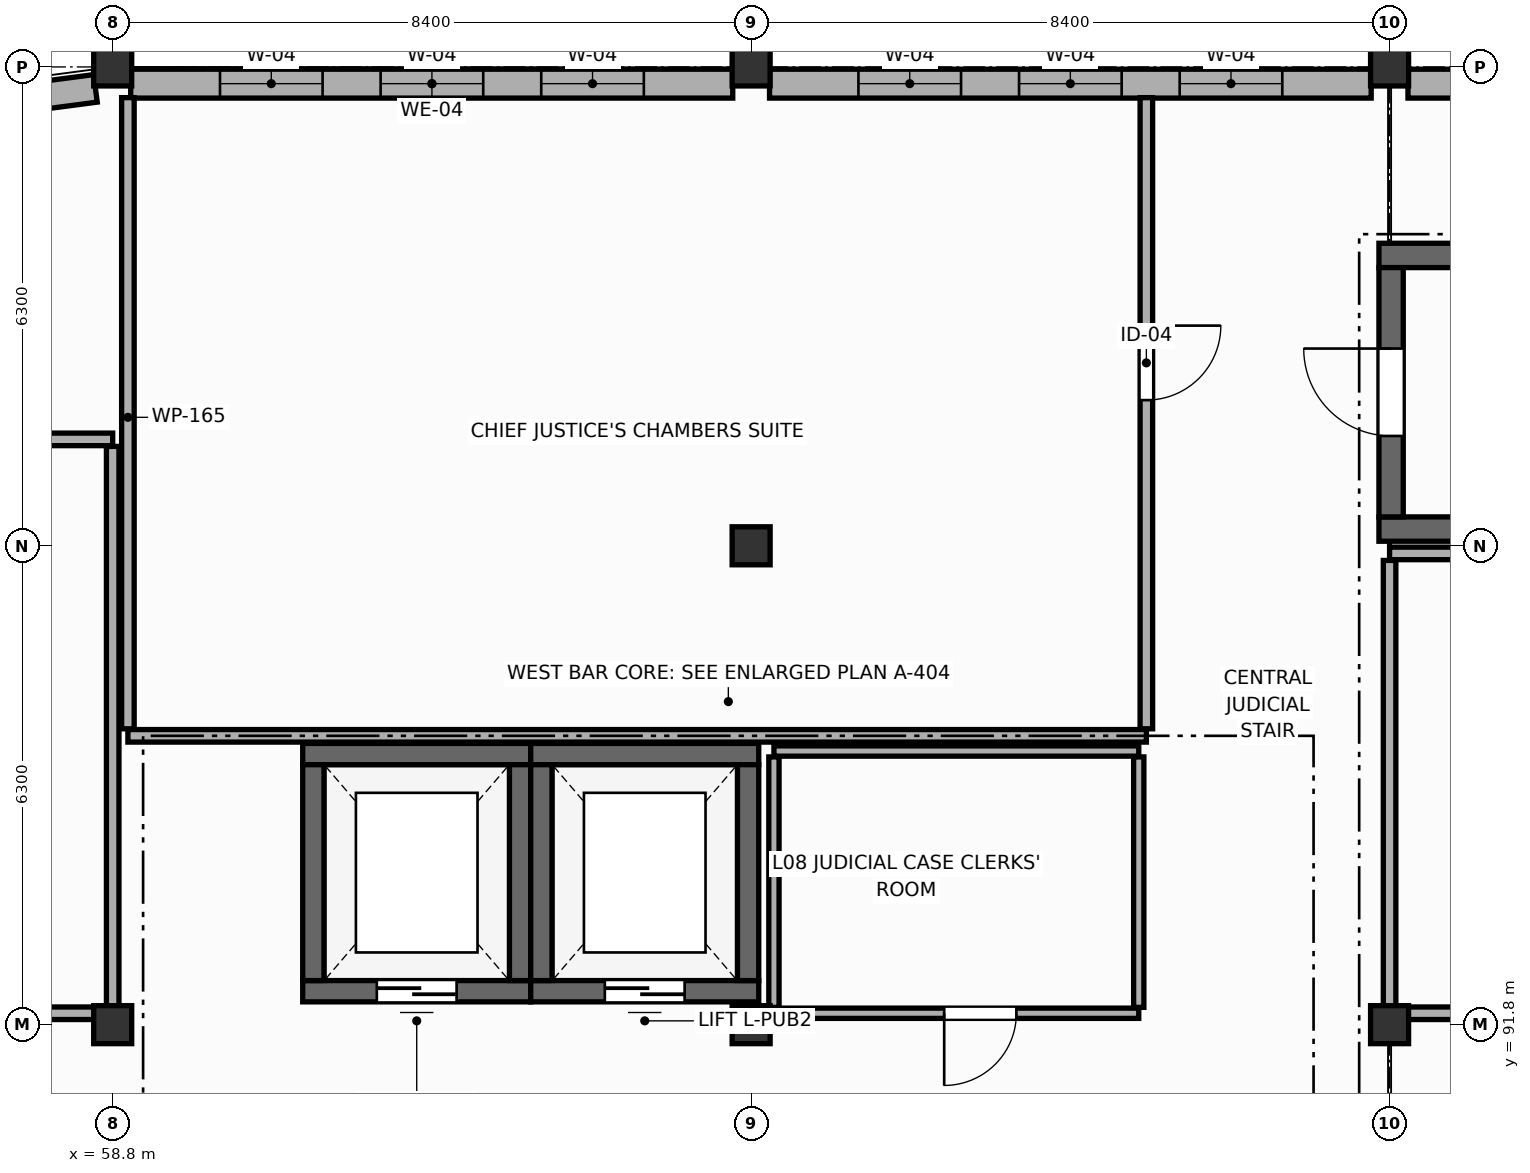
"""IFC4 building model, lengths in metres.
Left out: names, types, materials, properties, quantities, classifications, styles, units other than length and angle.
Written with IfcOpenShell. Run it as: python <this file> out.ifc"""

import sys

from ifc_helpers import new_model, si_unit, direction, frame, frame_2d, origin, origin_2d, place, context, subcontext, project, spatial, rectangle, extrude, element, fill, save


model = new_model("IFC4")
c1 = context("Model", 3, precision=1e-05, world=origin(), true_north=direction((0.0, 1.0)))
c2 = subcontext(c1, "Body", "Model", "MODEL_VIEW")
j1 = project(units=[si_unit("LENGTHUNIT", "METRE"), si_unit("PLANEANGLEUNIT", "RADIAN")], contexts=[c1])
p1 = place(None, origin())
s1 = spatial("IfcSite", under=j1, at=p1, CompositionType="ELEMENT")
p2 = place(p1, origin())
s2 = spatial("IfcBuilding", under=s1, at=p2, CompositionType="ELEMENT")
p3 = place(p2, frame((0.0, 0.0, 31.2)))
s3 = spatial("IfcBuildingStorey", under=s2, at=p3, CompositionType="ELEMENT", Elevation=31.2)
for number, where, z_axis, x_axis in (
    (1, (58.8, 91.8, 0.0), (0.0, 0.0, 1.0), (1.0, 0.0, 0.0)),
    (2, (58.8, 104.4, 0.0), (0.0, 0.0, 1.0), (1.0, 0.0, 0.0)),
    (3, (67.2, 91.8, 0.0), (0.0, 0.0, 1.0), (1.0, 0.0, 0.0)),
    (4, (67.2, 104.4, 0.0), (0.0, 0.0, 1.0), (1.0, 0.0, 0.0)),
    (5, (67.2, 98.1, 0.0), (0.0, 0.0, 1.0), (1.0, 0.0, 0.0)),
    (6, (75.6, 91.8, 0.0), (0.0, 0.0, 1.0), (1.0, 0.0, 0.0)),
    (7, (75.6, 104.4, 0.0), (0.0, 0.0, 1.0), (1.0, 0.0, 0.0)),
):
    element("IfcColumn", number, at=place(p3, frame(where, z_axis=z_axis, x_axis=x_axis)), inside=s3, PredefinedType="COLUMN", context=c2, shape_type="SweptSolid", body=[
        extrude(rectangle(XDim=0.5, YDim=0.5, at=origin_2d()), origin(), (0.0, 0.0, 1.0), 4.2),
    ])
p4 = place(p3, frame((59.037, 104.18, 0.0), z_axis=(0.0, 0.0, 1.0), x_axis=(1.0, 0.0, 0.0)))
e8 = element("IfcWall", 8, at=p4, inside=s3, PredefinedType="STANDARD", context=c2, shape_type="SweptSolid", body=[
    extrude(rectangle(XDim=7.921, YDim=0.38, at=frame_2d((3.96, 0.0))), origin(), (0.0, 0.0, 1.0), 3.11),
])
p5 = place(p4, frame((1.175, 0.0, 0.85)))
e9 = element("IfcOpeningElement", 9, at=p5, cuts=e8, PredefinedType="OPENING", context=c2, shape_type="SweptSolid", body=[
    extrude(rectangle(XDim=1.35, YDim=1.95, at=frame_2d((0.675, 0.975))), frame((0.0, 0.2, 0.0), z_axis=(0.0, -1.0, 0.0), x_axis=(1.0, 0.0, 0.0)), (0.0, 0.0, 1.0), 0.4),
])
p6 = place(p4, frame((3.288, 0.0, 0.85)))
e10 = element("IfcOpeningElement", 10, at=p6, cuts=e8, PredefinedType="OPENING", context=c2, shape_type="SweptSolid", body=[
    extrude(rectangle(XDim=1.35, YDim=1.95, at=frame_2d((0.675, 0.975))), frame((0.0, 0.2, 0.0), z_axis=(0.0, -1.0, 0.0), x_axis=(1.0, 0.0, 0.0)), (0.0, 0.0, 1.0), 0.4),
])
p7 = place(p4, frame((5.401, 0.0, 0.85)))
e11 = element("IfcOpeningElement", 11, at=p7, cuts=e8, PredefinedType="OPENING", context=c2, shape_type="SweptSolid", body=[
    extrude(rectangle(XDim=1.35, YDim=1.95, at=frame_2d((0.675, 0.975))), frame((0.0, 0.2, 0.0), z_axis=(0.0, -1.0, 0.0), x_axis=(1.0, 0.0, 0.0)), (0.0, 0.0, 1.0), 0.4),
])
p8 = place(p3, frame((67.442, 104.18, 0.0), z_axis=(0.0, 0.0, 1.0), x_axis=(1.0, 0.0, 0.0)))
e12 = element("IfcWall", 12, at=p8, inside=s3, PredefinedType="STANDARD", context=c2, shape_type="SweptSolid", body=[
    extrude(rectangle(XDim=7.916, YDim=0.38, at=frame_2d((3.958, 0.0))), origin(), (0.0, 0.0, 1.0), 3.11),
])
p9 = place(p8, frame((1.17, 0.0, 0.85)))
e13 = element("IfcOpeningElement", 13, at=p9, cuts=e12, PredefinedType="OPENING", context=c2, shape_type="SweptSolid", body=[
    extrude(rectangle(XDim=1.35, YDim=1.95, at=frame_2d((0.675, 0.975))), frame((0.0, 0.2, 0.0), z_axis=(0.0, -1.0, 0.0), x_axis=(1.0, 0.0, 0.0)), (0.0, 0.0, 1.0), 0.4),
])
p10 = place(p8, frame((3.283, 0.0, 0.85)))
e14 = element("IfcOpeningElement", 14, at=p10, cuts=e12, PredefinedType="OPENING", context=c2, shape_type="SweptSolid", body=[
    extrude(rectangle(XDim=1.35, YDim=1.95, at=frame_2d((0.675, 0.975))), frame((0.0, 0.2, 0.0), z_axis=(0.0, -1.0, 0.0), x_axis=(1.0, 0.0, 0.0)), (0.0, 0.0, 1.0), 0.4),
])
p11 = place(p8, frame((5.396, 0.0, 0.85)))
e15 = element("IfcOpeningElement", 15, at=p11, cuts=e12, PredefinedType="OPENING", context=c2, shape_type="SweptSolid", body=[
    extrude(rectangle(XDim=1.35, YDim=1.95, at=frame_2d((0.675, 0.975))), frame((0.0, 0.2, 0.0), z_axis=(0.0, -1.0, 0.0), x_axis=(1.0, 0.0, 0.0)), (0.0, 0.0, 1.0), 0.4),
])
p12 = place(p3, frame((75.842, 104.18, 0.0), z_axis=(0.0, 0.0, 1.0), x_axis=(1.0, 0.0, 0.0)))
e16 = element("IfcWall", 16, at=p12, inside=s3, PredefinedType="STANDARD", context=c2, shape_type="SweptSolid", body=[
    extrude(rectangle(XDim=7.916, YDim=0.38, at=frame_2d((3.958, 0.0))), origin(), (0.0, 0.0, 1.0), 3.11),
])
p13 = place(p3, frame((58.573, 104.118, 0.0), z_axis=(0.0, 0.0, 1.0), x_axis=(-0.991449079029, -0.130494151946, 0.0)))
e17 = element("IfcWall", 17, at=p13, inside=s3, PredefinedType="ELEMENTEDWALL", context=c2, shape_type="SweptSolid", body=[
    extrude(rectangle(XDim=3.027, YDim=0.365, at=frame_2d((1.514, 0.0))), origin(), (0.0, 0.0, 1.0), 3.11),
])
p14 = place(p13, frame((1.128, 0.0, 0.85)))
e18 = element("IfcOpeningElement", 18, at=p14, cuts=e17, PredefinedType="OPENING", context=c2, shape_type="SweptSolid", body=[
    extrude(rectangle(XDim=0.8, YDim=1.7, at=frame_2d((0.4, 0.85))), frame((0.0, 0.192, 0.0), z_axis=(0.0, -1.0, 0.0), x_axis=(1.0, 0.0, 0.0)), (0.0, 0.0, 1.0), 0.385),
])
for number, where, z_axis, x_axis in (
    (19, (75.46, 101.92, 0.0), (0.0, 0.0, 1.0), (1.0, 0.0, 0.0)),
    (20, (84.54, 98.32, 0.0), (0.0, 0.0, 1.0), (-1.0, 0.0, 0.0)),
):
    element("IfcWall", number, at=place(p3, frame(where, z_axis=z_axis, x_axis=x_axis)), inside=s3, PredefinedType="SHEAR", context=c2, shape_type="SweptSolid", body=[
        extrude(rectangle(XDim=9.08, YDim=0.32, at=frame_2d((4.54, 0.0))), origin(), (0.0, 0.0, 1.0), 3.98),
    ])
p15 = place(p3, frame((75.62, 98.48, 0.0), z_axis=(0.0, 0.0, 1.0), x_axis=(0.0, 1.0, 0.0)))
e21 = element("IfcWall", 21, at=p15, inside=s3, PredefinedType="SHEAR", context=c2, shape_type="SweptSolid", body=[
    extrude(rectangle(XDim=3.28, YDim=0.32, at=frame_2d((1.64, 0.0))), origin(), (0.0, 0.0, 1.0), 3.98),
])
p16 = place(p15, frame((1.065, 0.0, 0.0)))
e22 = element("IfcOpeningElement", 22, at=p16, cuts=e21, PredefinedType="OPENING", context=c2, shape_type="SweptSolid", body=[
    extrude(rectangle(XDim=1.15, YDim=2.2, at=frame_2d((0.575, 1.1))), frame((0.0, 0.17, 0.0), z_axis=(0.0, -1.0, 0.0), x_axis=(1.0, 0.0, 0.0)), (0.0, 0.0, 1.0), 0.34),
])
p17 = place(p3, frame((61.3, 95.36, 0.0), z_axis=(0.0, 0.0, 1.0), x_axis=(1.0, 0.0, 0.0)))
e23 = element("IfcWall", 23, at=p17, inside=s3, PredefinedType="SHEAR", context=c2, shape_type="SweptSolid", body=[
    extrude(rectangle(XDim=3.0, YDim=0.28, at=frame_2d((1.5, 0.0))), origin(), (0.0, 0.0, 1.0), 3.98),
])
p18 = place(p3, frame((64.3, 92.24, 0.0), z_axis=(0.0, 0.0, 1.0), x_axis=(-1.0, 0.0, 0.0)))
e24 = element("IfcWall", 24, at=p18, inside=s3, PredefinedType="SHEAR", context=c2, shape_type="SweptSolid", body=[
    extrude(rectangle(XDim=3.0, YDim=0.28, at=frame_2d((1.5, 0.0))), origin(), (0.0, 0.0, 1.0), 3.98),
])
p19 = place(p18, frame((0.975, 0.0, 0.0)))
e25 = element("IfcOpeningElement", 25, at=p19, cuts=e24, PredefinedType="OPENING", context=c2, shape_type="SweptSolid", body=[
    extrude(rectangle(XDim=1.05, YDim=2.2, at=frame_2d((0.525, 1.1))), frame((0.0, 0.15, 0.0), z_axis=(0.0, -1.0, 0.0), x_axis=(1.0, 0.0, 0.0)), (0.0, 0.0, 1.0), 0.3),
])
for number, where, z_axis, x_axis in (
    (26, (61.44, 92.38, 0.0), (0.0, 0.0, 1.0), (0.0, 1.0, 0.0)),
    (27, (64.16, 95.22, 0.0), (0.0, 0.0, 1.0), (0.0, -1.0, 0.0)),
):
    element("IfcWall", number, at=place(p3, frame(where, z_axis=z_axis, x_axis=x_axis)), inside=s3, PredefinedType="SHEAR", context=c2, shape_type="SweptSolid", body=[
        extrude(rectangle(XDim=2.84, YDim=0.28, at=frame_2d((1.42, 0.0))), origin(), (0.0, 0.0, 1.0), 3.98),
    ])
p20 = place(p3, frame((64.3, 95.36, 0.0), z_axis=(0.0, 0.0, 1.0), x_axis=(1.0, 0.0, 0.0)))
e28 = element("IfcWall", 28, at=p20, inside=s3, PredefinedType="SHEAR", context=c2, shape_type="SweptSolid", body=[
    extrude(rectangle(XDim=3.0, YDim=0.28, at=frame_2d((1.5, 0.0))), origin(), (0.0, 0.0, 1.0), 3.98),
])
p21 = place(p3, frame((67.3, 92.24, 0.0), z_axis=(0.0, 0.0, 1.0), x_axis=(-1.0, 0.0, 0.0)))
e29 = element("IfcWall", 29, at=p21, inside=s3, PredefinedType="SHEAR", context=c2, shape_type="SweptSolid", body=[
    extrude(rectangle(XDim=3.0, YDim=0.28, at=frame_2d((1.5, 0.0))), origin(), (0.0, 0.0, 1.0), 3.98),
])
p22 = place(p21, frame((0.975, 0.0, 0.0)))
e30 = element("IfcOpeningElement", 30, at=p22, cuts=e29, PredefinedType="OPENING", context=c2, shape_type="SweptSolid", body=[
    extrude(rectangle(XDim=1.05, YDim=2.2, at=frame_2d((0.525, 1.1))), frame((0.0, 0.15, 0.0), z_axis=(0.0, -1.0, 0.0), x_axis=(1.0, 0.0, 0.0)), (0.0, 0.0, 1.0), 0.3),
])
for number, where, z_axis, x_axis in (
    (31, (64.44, 92.38, 0.0), (0.0, 0.0, 1.0), (0.0, 1.0, 0.0)),
    (32, (67.16, 95.22, 0.0), (0.0, 0.0, 1.0), (0.0, -1.0, 0.0)),
):
    element("IfcWall", number, at=place(p3, frame(where, z_axis=z_axis, x_axis=x_axis)), inside=s3, PredefinedType="SHEAR", context=c2, shape_type="SweptSolid", body=[
        extrude(rectangle(XDim=2.84, YDim=0.28, at=frame_2d((1.42, 0.0))), origin(), (0.0, 0.0, 1.0), 3.98),
    ])
p23 = place(p3, frame((72.4, 95.6, 0.0), z_axis=(0.0, 0.0, 1.0), x_axis=(-1.0, 0.0, 0.0)))
e33 = element("IfcWall", 33, at=p23, inside=s3, PredefinedType="PARTITIONING", context=c2, shape_type="SweptSolid", body=[
    extrude(rectangle(XDim=13.4, YDim=0.165, at=frame_2d((6.7, 0.0))), origin(), (0.0, 0.0, 1.0), 3.11),
])
p24 = place(p3, frame((59.0, 95.692, 0.0), z_axis=(0.0, 0.0, 1.0), x_axis=(0.0, 1.0, 0.0)))
e34 = element("IfcWall", 34, at=p24, inside=s3, PredefinedType="PARTITIONING", context=c2, shape_type="SweptSolid", body=[
    extrude(rectangle(XDim=8.304, YDim=0.165, at=frame_2d((4.152, 0.0))), origin(), (0.0, 0.0, 1.0), 3.11),
])
p25 = place(p3, frame((72.4, 103.996, 0.0), z_axis=(0.0, 0.0, 1.0), x_axis=(0.0, -1.0, 0.0)))
e35 = element("IfcWall", 35, at=p25, inside=s3, PredefinedType="PARTITIONING", context=c2, shape_type="SweptSolid", body=[
    extrude(rectangle(XDim=8.304, YDim=0.165, at=frame_2d((4.152, 0.0))), origin(), (0.0, 0.0, 1.0), 3.965),
])
p26 = place(p25, frame((3.0, 0.0, 0.0)))
e36 = element("IfcOpeningElement", 36, at=p26, cuts=e35, PredefinedType="OPENING", context=c2, shape_type="SweptSolid", body=[
    extrude(rectangle(XDim=0.98, YDim=2.2, at=frame_2d((0.49, 1.1))), frame((0.0, 0.093, 0.0), z_axis=(0.0, -1.0, 0.0), x_axis=(1.0, 0.0, 0.0)), (0.0, 0.0, 1.0), 0.185),
])
p27 = place(p3, frame((67.5, 95.4, 0.0), z_axis=(0.0, 0.0, 1.0), x_axis=(1.0, 0.0, 0.0)))
e37 = element("IfcWall", 37, at=p27, inside=s3, PredefinedType="PARTITIONING", context=c2, shape_type="SweptSolid", body=[
    extrude(rectangle(XDim=4.8, YDim=0.135, at=frame_2d((2.4, 0.0))), origin(), (0.0, 0.0, 1.0), 3.51),
])
p28 = place(p3, frame((72.3, 91.95, 0.0), z_axis=(0.0, 0.0, 1.0), x_axis=(-1.0, 0.0, 0.0)))
e38 = element("IfcWall", 38, at=p28, inside=s3, PredefinedType="PARTITIONING", context=c2, shape_type="SweptSolid", body=[
    extrude(rectangle(XDim=4.8, YDim=0.135, at=frame_2d((2.4, 0.0))), origin(), (0.0, 0.0, 1.0), 3.41),
])
p29 = place(p28, frame((1.61, 0.0, 0.0)))
e39 = element("IfcOpeningElement", 39, at=p29, cuts=e38, PredefinedType="OPENING", context=c2, shape_type="SweptSolid", body=[
    extrude(rectangle(XDim=0.95, YDim=2.15, at=frame_2d((0.475, 1.075))), frame((0.0, 0.077, 0.0), z_axis=(0.0, -1.0, 0.0), x_axis=(1.0, 0.0, 0.0)), (0.0, 0.0, 1.0), 0.155),
])
for number, where, z_axis, x_axis in (
    (40, (67.5, 92.028, 0.0), (0.0, 0.0, 1.0), (0.0, 1.0, 0.0)),
    (41, (72.3, 95.323, 0.0), (0.0, 0.0, 1.0), (0.0, -1.0, 0.0)),
):
    element("IfcWall", number, at=place(p3, frame(where, z_axis=z_axis, x_axis=x_axis)), inside=s3, PredefinedType="PARTITIONING", context=c2, shape_type="SweptSolid", body=[
        extrude(rectangle(XDim=3.295, YDim=0.135, at=frame_2d((1.647, 0.0))), origin(), (0.0, 0.0, 1.0), 3.41),
    ])
p30 = place(p3, frame((75.6, 98.0, 0.0), z_axis=(0.0, 0.0, 1.0), x_axis=(1.0, 0.0, 0.0)))
e42 = element("IfcWall", 42, at=p30, inside=s3, PredefinedType="PARTITIONING", context=c2, shape_type="SweptSolid", body=[
    extrude(rectangle(XDim=8.8, YDim=0.165, at=frame_2d((4.4, 0.0))), origin(), (0.0, 0.0, 1.0), 3.11),
])
p31 = place(p3, frame((84.4, 91.95, 0.0), z_axis=(0.0, 0.0, 1.0), x_axis=(-1.0, 0.0, 0.0)))
e43 = element("IfcWall", 43, at=p31, inside=s3, PredefinedType="PARTITIONING", context=c2, shape_type="SweptSolid", body=[
    extrude(rectangle(XDim=8.8, YDim=0.165, at=frame_2d((4.4, 0.0))), origin(), (0.0, 0.0, 1.0), 3.11),
])
p32 = place(p31, frame((3.19, 0.0, 0.0)))
e44 = element("IfcOpeningElement", 44, at=p32, cuts=e43, PredefinedType="OPENING", context=c2, shape_type="SweptSolid", body=[
    extrude(rectangle(XDim=1.0, YDim=2.15, at=frame_2d((0.5, 1.075))), frame((0.0, 0.093, 0.0), z_axis=(0.0, -1.0, 0.0), x_axis=(1.0, 0.0, 0.0)), (0.0, 0.0, 1.0), 0.185),
])
p33 = place(p3, frame((75.6, 92.042, 0.0), z_axis=(0.0, 0.0, 1.0), x_axis=(0.0, 1.0, 0.0)))
e45 = element("IfcWall", 45, at=p33, inside=s3, PredefinedType="PARTITIONING", context=c2, shape_type="SweptSolid", body=[
    extrude(rectangle(XDim=5.865, YDim=0.165, at=frame_2d((2.933, 0.0))), origin(), (0.0, 0.0, 1.0), 3.11),
])
p34 = place(p3, frame((49.3, 99.5, 0.0), z_axis=(0.0, 0.0, 1.0), x_axis=(1.0, 0.0, 0.0)))
e46 = element("IfcWall", 46, at=p34, inside=s3, PredefinedType="PARTITIONING", context=c2, shape_type="SweptSolid", body=[
    extrude(rectangle(XDim=9.5, YDim=0.165, at=frame_2d((4.75, 0.0))), origin(), (0.0, 0.0, 1.0), 3.01),
])
p35 = place(p3, frame((58.8, 91.95, 0.0), z_axis=(0.0, 0.0, 1.0), x_axis=(-1.0, 0.0, 0.0)))
e47 = element("IfcWall", 47, at=p35, inside=s3, PredefinedType="PARTITIONING", context=c2, shape_type="SweptSolid", body=[
    extrude(rectangle(XDim=9.5, YDim=0.165, at=frame_2d((4.75, 0.0))), origin(), (0.0, 0.0, 1.0), 3.01),
])
p36 = place(p35, frame((3.087, 0.0, 0.0)))
e48 = element("IfcOpeningElement", 48, at=p36, cuts=e47, PredefinedType="OPENING", context=c2, shape_type="SweptSolid", body=[
    extrude(rectangle(XDim=0.98, YDim=2.2, at=frame_2d((0.49, 1.1))), frame((0.0, 0.093, 0.0), z_axis=(0.0, -1.0, 0.0), x_axis=(1.0, 0.0, 0.0)), (0.0, 0.0, 1.0), 0.185),
])
p37 = place(p3, frame((58.8, 99.407, 0.0), z_axis=(0.0, 0.0, 1.0), x_axis=(0.0, -1.0, 0.0)))
e49 = element("IfcWall", 49, at=p37, inside=s3, PredefinedType="PARTITIONING", context=c2, shape_type="SweptSolid", body=[
    extrude(rectangle(XDim=7.365, YDim=0.165, at=frame_2d((3.683, 0.0))), origin(), (0.0, 0.0, 1.0), 3.11),
])
p38 = place(p5, origin())
e50 = element("IfcWindow", 50, at=p38, inside=s3, PartitioningType="SINGLE_PANEL", PredefinedType="WINDOW", context=c2, shape_type="SweptSolid", body=[
    extrude(rectangle(XDim=1.35, YDim=1.95, at=frame_2d((0.675, 0.975))), frame((0.0, 0.03, 0.0), z_axis=(0.0, -1.0, 0.0), x_axis=(1.0, 0.0, 0.0)), (0.0, 0.0, 1.0), 0.06),
])
fill(e9, e50)
p39 = place(p6, origin())
e51 = element("IfcWindow", 51, at=p39, inside=s3, PartitioningType="SINGLE_PANEL", PredefinedType="WINDOW", context=c2, shape_type="SweptSolid", body=[
    extrude(rectangle(XDim=1.35, YDim=1.95, at=frame_2d((0.675, 0.975))), frame((0.0, 0.03, 0.0), z_axis=(0.0, -1.0, 0.0), x_axis=(1.0, 0.0, 0.0)), (0.0, 0.0, 1.0), 0.06),
])
fill(e10, e51)
p40 = place(p7, origin())
e52 = element("IfcWindow", 52, at=p40, inside=s3, PartitioningType="SINGLE_PANEL", PredefinedType="WINDOW", context=c2, shape_type="SweptSolid", body=[
    extrude(rectangle(XDim=1.35, YDim=1.95, at=frame_2d((0.675, 0.975))), frame((0.0, 0.03, 0.0), z_axis=(0.0, -1.0, 0.0), x_axis=(1.0, 0.0, 0.0)), (0.0, 0.0, 1.0), 0.06),
])
fill(e11, e52)
p41 = place(p9, origin())
e53 = element("IfcWindow", 53, at=p41, inside=s3, PartitioningType="SINGLE_PANEL", PredefinedType="WINDOW", context=c2, shape_type="SweptSolid", body=[
    extrude(rectangle(XDim=1.35, YDim=1.95, at=frame_2d((0.675, 0.975))), frame((0.0, 0.03, 0.0), z_axis=(0.0, -1.0, 0.0), x_axis=(1.0, 0.0, 0.0)), (0.0, 0.0, 1.0), 0.06),
])
fill(e13, e53)
p42 = place(p10, origin())
e54 = element("IfcWindow", 54, at=p42, inside=s3, PartitioningType="SINGLE_PANEL", PredefinedType="WINDOW", context=c2, shape_type="SweptSolid", body=[
    extrude(rectangle(XDim=1.35, YDim=1.95, at=frame_2d((0.675, 0.975))), frame((0.0, 0.03, 0.0), z_axis=(0.0, -1.0, 0.0), x_axis=(1.0, 0.0, 0.0)), (0.0, 0.0, 1.0), 0.06),
])
fill(e14, e54)
p43 = place(p11, origin())
e55 = element("IfcWindow", 55, at=p43, inside=s3, PartitioningType="SINGLE_PANEL", PredefinedType="WINDOW", context=c2, shape_type="SweptSolid", body=[
    extrude(rectangle(XDim=1.35, YDim=1.95, at=frame_2d((0.675, 0.975))), frame((0.0, 0.03, 0.0), z_axis=(0.0, -1.0, 0.0), x_axis=(1.0, 0.0, 0.0)), (0.0, 0.0, 1.0), 0.06),
])
fill(e15, e55)
p44 = place(p16, origin())
e56 = element("IfcDoor", 56, at=p44, inside=s3, OperationType="SINGLE_SWING_RIGHT", PredefinedType="DOOR", context=c2, shape_type="SweptSolid", body=[
    extrude(rectangle(XDim=1.15, YDim=2.2, at=frame_2d((0.575, 1.1))), frame((0.0, 0.025, 0.0), z_axis=(0.0, -1.0, 0.0), x_axis=(1.0, 0.0, 0.0)), (0.0, 0.0, 1.0), 0.05),
])
fill(e22, e56)
p45 = place(p19, origin())
e57 = element("IfcDoor", 57, at=p45, inside=s3, OperationType="DOUBLE_DOOR_SLIDING", PredefinedType="DOOR", context=c2, shape_type="SweptSolid", body=[
    extrude(rectangle(XDim=1.05, YDim=2.2, at=frame_2d((0.525, 1.1))), frame((0.0, 0.025, 0.0), z_axis=(0.0, -1.0, 0.0), x_axis=(1.0, 0.0, 0.0)), (0.0, 0.0, 1.0), 0.05),
])
fill(e25, e57)
p46 = place(p22, origin())
e58 = element("IfcDoor", 58, at=p46, inside=s3, OperationType="DOUBLE_DOOR_SLIDING", PredefinedType="DOOR", context=c2, shape_type="SweptSolid", body=[
    extrude(rectangle(XDim=1.05, YDim=2.2, at=frame_2d((0.525, 1.1))), frame((0.0, 0.025, 0.0), z_axis=(0.0, -1.0, 0.0), x_axis=(1.0, 0.0, 0.0)), (0.0, 0.0, 1.0), 0.05),
])
fill(e30, e58)
p47 = place(p26, origin())
e59 = element("IfcDoor", 59, at=p47, inside=s3, OperationType="SINGLE_SWING_LEFT", PredefinedType="DOOR", context=c2, shape_type="SweptSolid", body=[
    extrude(rectangle(XDim=0.98, YDim=2.2, at=frame_2d((0.49, 1.1))), frame((0.0, 0.025, 0.0), z_axis=(0.0, -1.0, 0.0), x_axis=(1.0, 0.0, 0.0)), (0.0, 0.0, 1.0), 0.05),
])
fill(e36, e59)
p48 = place(p29, origin())
e60 = element("IfcDoor", 60, at=p48, inside=s3, OperationType="SINGLE_SWING_RIGHT", PredefinedType="DOOR", context=c2, shape_type="SweptSolid", body=[
    extrude(rectangle(XDim=0.95, YDim=2.15, at=frame_2d((0.475, 1.075))), frame((0.0, 0.025, 0.0), z_axis=(0.0, -1.0, 0.0), x_axis=(1.0, 0.0, 0.0)), (0.0, 0.0, 1.0), 0.05),
])
fill(e39, e60)
save(model, sys.argv[1])
